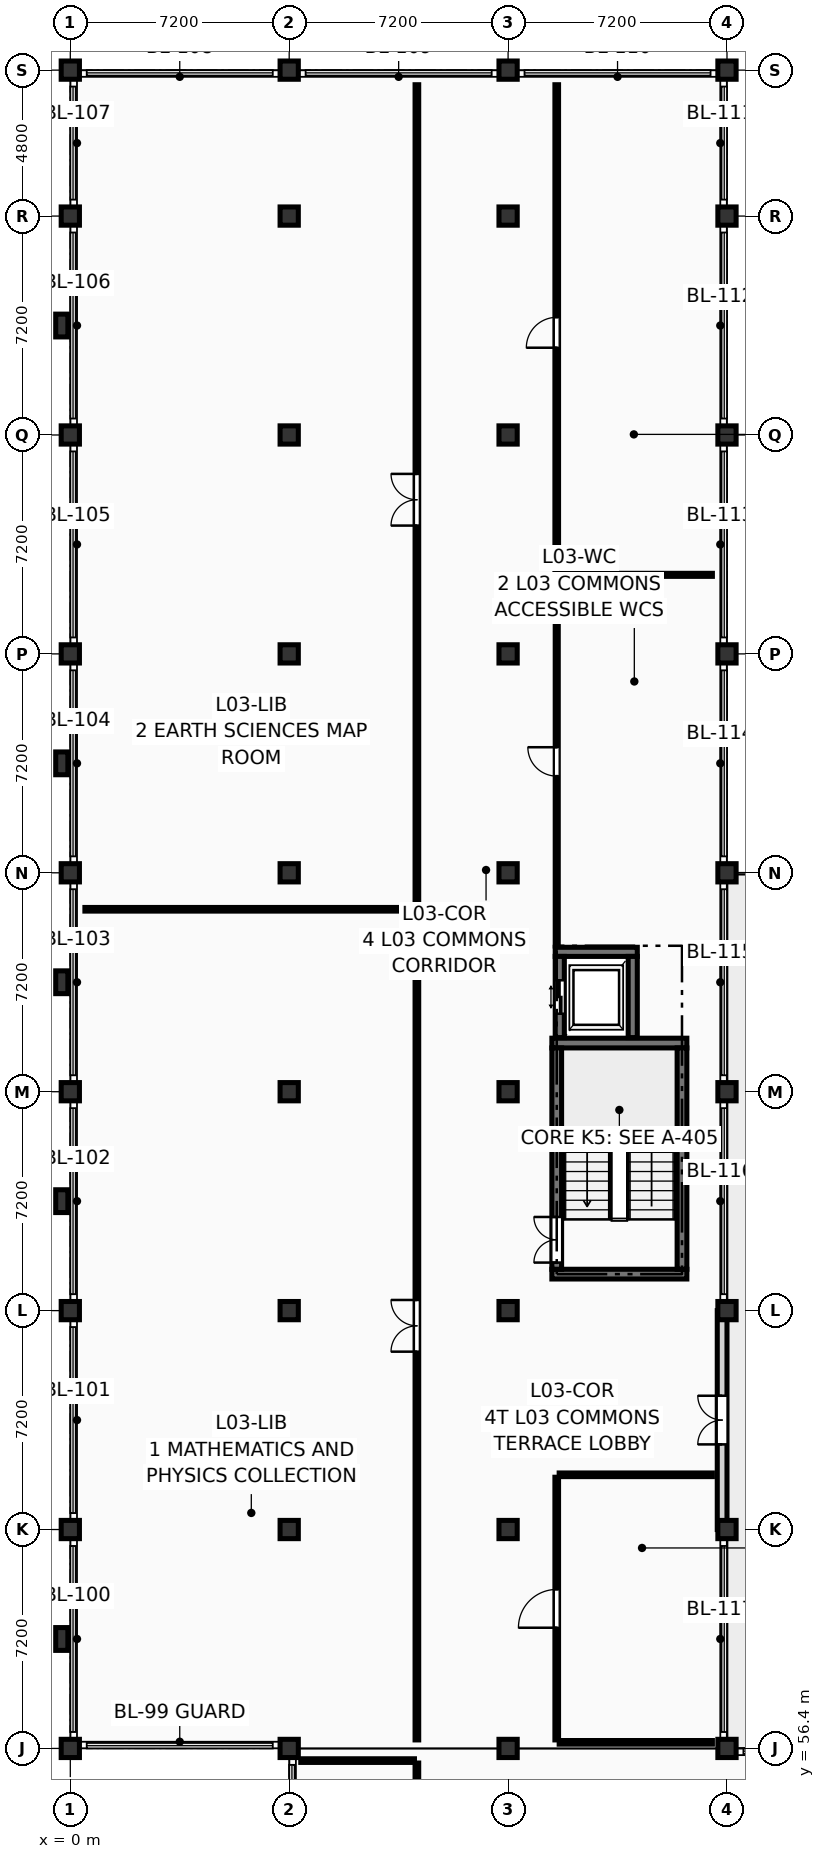
"""IFC4 building model, lengths in metres.
Left out: names, types, materials, properties, quantities, classifications, styles, units other than length and angle.
Written with IfcOpenShell. Run it as: python <this file> out.ifc"""

import sys

from ifc_helpers import new_model, si_unit, direction, frame, frame_2d, origin, origin_2d, place, context, subcontext, project, spatial, rectangle, extrude, element, fill, save


model = new_model("IFC4")
c1 = context("Model", 3, precision=1e-05, world=origin(), true_north=direction((0.0, 1.0)))
c2 = subcontext(c1, "Body", "Model", "MODEL_VIEW")
j1 = project(units=[si_unit("LENGTHUNIT", "METRE"), si_unit("PLANEANGLEUNIT", "RADIAN")], contexts=[c1])
p1 = place(None, origin())
s1 = spatial("IfcSite", under=j1, at=p1, CompositionType="ELEMENT")
p2 = place(p1, origin())
s2 = spatial("IfcBuilding", under=s1, at=p2, CompositionType="ELEMENT")
p3 = place(p2, frame((0.0, 0.0, 12.15)))
s3 = spatial("IfcBuildingStorey", under=s2, at=p3, CompositionType="ELEMENT", Elevation=12.15)
for number, where, z_axis, x_axis in (
    (1, (0.0, 56.4, 0.0), (0.0, 0.0, 1.0), (1.0, 0.0, 0.0)),
    (2, (0.0, 63.6, 0.0), (0.0, 0.0, 1.0), (1.0, 0.0, 0.0)),
    (3, (0.0, 70.8, 0.0), (0.0, 0.0, 1.0), (1.0, 0.0, 0.0)),
    (4, (0.0, 78.0, 0.0), (0.0, 0.0, 1.0), (1.0, 0.0, 0.0)),
    (5, (0.0, 85.2, 0.0), (0.0, 0.0, 1.0), (1.0, 0.0, 0.0)),
    (6, (0.0, 92.4, 0.0), (0.0, 0.0, 1.0), (1.0, 0.0, 0.0)),
    (7, (0.0, 99.6, 0.0), (0.0, 0.0, 1.0), (1.0, 0.0, 0.0)),
    (8, (0.0, 106.8, 0.0), (0.0, 0.0, 1.0), (1.0, 0.0, 0.0)),
    (9, (0.0, 111.6, 0.0), (0.0, 0.0, 1.0), (1.0, 0.0, 0.0)),
    (10, (7.2, 56.4, 0.0), (0.0, 0.0, 1.0), (1.0, 0.0, 0.0)),
    (11, (7.2, 63.6, 0.0), (0.0, 0.0, 1.0), (1.0, 0.0, 0.0)),
    (12, (7.2, 70.8, 0.0), (0.0, 0.0, 1.0), (1.0, 0.0, 0.0)),
    (13, (7.2, 78.0, 0.0), (0.0, 0.0, 1.0), (1.0, 0.0, 0.0)),
    (14, (7.2, 85.2, 0.0), (0.0, 0.0, 1.0), (1.0, 0.0, 0.0)),
    (15, (7.2, 92.4, 0.0), (0.0, 0.0, 1.0), (1.0, 0.0, 0.0)),
    (16, (7.2, 99.6, 0.0), (0.0, 0.0, 1.0), (1.0, 0.0, 0.0)),
    (17, (7.2, 106.8, 0.0), (0.0, 0.0, 1.0), (1.0, 0.0, 0.0)),
    (18, (7.2, 111.6, 0.0), (0.0, 0.0, 1.0), (1.0, 0.0, 0.0)),
    (19, (14.4, 56.4, 0.0), (0.0, 0.0, 1.0), (1.0, 0.0, 0.0)),
    (20, (14.4, 63.6, 0.0), (0.0, 0.0, 1.0), (1.0, 0.0, 0.0)),
    (21, (14.4, 70.8, 0.0), (0.0, 0.0, 1.0), (1.0, 0.0, 0.0)),
    (22, (14.4, 78.0, 0.0), (0.0, 0.0, 1.0), (1.0, 0.0, 0.0)),
    (23, (14.4, 85.2, 0.0), (0.0, 0.0, 1.0), (1.0, 0.0, 0.0)),
    (24, (14.4, 92.4, 0.0), (0.0, 0.0, 1.0), (1.0, 0.0, 0.0)),
    (25, (14.4, 99.6, 0.0), (0.0, 0.0, 1.0), (1.0, 0.0, 0.0)),
    (26, (14.4, 106.8, 0.0), (0.0, 0.0, 1.0), (1.0, 0.0, 0.0)),
    (27, (14.4, 111.6, 0.0), (0.0, 0.0, 1.0), (1.0, 0.0, 0.0)),
    (28, (21.6, 56.4, 0.0), (0.0, 0.0, 1.0), (1.0, 0.0, 0.0)),
    (29, (21.6, 63.6, 0.0), (0.0, 0.0, 1.0), (1.0, 0.0, 0.0)),
    (30, (21.6, 70.8, 0.0), (0.0, 0.0, 1.0), (1.0, 0.0, 0.0)),
    (31, (21.6, 78.0, 0.0), (0.0, 0.0, 1.0), (1.0, 0.0, 0.0)),
    (32, (21.6, 85.2, 0.0), (0.0, 0.0, 1.0), (1.0, 0.0, 0.0)),
    (33, (21.6, 92.4, 0.0), (0.0, 0.0, 1.0), (1.0, 0.0, 0.0)),
    (34, (21.6, 99.6, 0.0), (0.0, 0.0, 1.0), (1.0, 0.0, 0.0)),
    (35, (21.6, 106.8, 0.0), (0.0, 0.0, 1.0), (1.0, 0.0, 0.0)),
    (36, (21.6, 111.6, 0.0), (0.0, 0.0, 1.0), (1.0, 0.0, 0.0)),
):
    element("IfcColumn", number, at=place(p3, frame(where, z_axis=z_axis, x_axis=x_axis)), inside=s3, PredefinedType="COLUMN", context=c2, shape_type="SweptSolid", body=[
        extrude(rectangle(XDim=0.6, YDim=0.6, at=origin_2d()), origin(), (0.0, 0.0, 1.0), 3.6),
    ])
for number, where, z_axis, x_axis in (
    (37, (-0.28, 60.0, 0.0), (0.0, 0.0, 1.0), (1.0, 0.0, 0.0)),
    (38, (-0.28, 74.4, 0.0), (0.0, 0.0, 1.0), (1.0, 0.0, 0.0)),
    (39, (-0.28, 81.6, 0.0), (0.0, 0.0, 1.0), (1.0, 0.0, 0.0)),
    (40, (-0.28, 88.8, 0.0), (0.0, 0.0, 1.0), (1.0, 0.0, 0.0)),
    (41, (-0.28, 103.2, 0.0), (0.0, 0.0, 1.0), (1.0, 0.0, 0.0)),
):
    element("IfcColumn", number, at=place(p3, frame(where, z_axis=z_axis, x_axis=x_axis)), inside=s3, PredefinedType="PILASTER", context=c2, shape_type="SweptSolid", body=[
        extrude(rectangle(XDim=0.4, YDim=0.75, at=origin_2d()), origin(), (0.0, 0.0, 1.0), 3.6),
    ])
p4 = place(p3, frame((21.44, 63.6, 0.0), z_axis=(0.0, 0.0, 1.0), x_axis=(0.0, 1.0, 0.0)))
e42 = element("IfcWall", 42, at=p4, inside=s3, PredefinedType="SOLIDWALL", context=c2, shape_type="SweptSolid", body=[
    extrude(rectangle(XDim=7.2, YDim=0.32, at=frame_2d((3.6, 0.0))), origin(), (0.0, 0.0, 1.0), 2.84),
])
p5 = place(p4, frame((2.8, 0.0, 0.0)))
e43 = element("IfcOpeningElement", 43, at=p5, cuts=e42, PredefinedType="OPENING", context=c2, shape_type="SweptSolid", body=[
    extrude(rectangle(XDim=1.6, YDim=2.25, at=frame_2d((0.8, 1.125))), frame((0.0, 0.172, 0.0), z_axis=(0.0, -1.0, 0.0), x_axis=(1.0, 0.0, 0.0)), (0.0, 0.0, 1.0), 0.344),
])
for number, where, z_axis, x_axis in (
    (44, (15.84, 72.0, 0.0), (0.0, 0.0, 1.0), (1.0, 0.0, 0.0)),
    (45, (15.84, 79.6, 0.0), (0.0, 0.0, 1.0), (1.0, 0.0, 0.0)),
):
    element("IfcWall", number, at=place(p3, frame(where, z_axis=z_axis, x_axis=x_axis)), inside=s3, PredefinedType="SHEAR", context=c2, shape_type="SweptSolid", body=[
        extrude(rectangle(XDim=4.44, YDim=0.32, at=frame_2d((2.22, 0.0))), origin(), (0.0, 0.0, 1.0), 3.39),
    ])
p6 = place(p3, frame((16.0, 72.16, 0.0), z_axis=(0.0, 0.0, 1.0), x_axis=(0.0, 1.0, 0.0)))
e46 = element("IfcWall", 46, at=p6, inside=s3, PredefinedType="SHEAR", context=c2, shape_type="SweptSolid", body=[
    extrude(rectangle(XDim=7.28, YDim=0.32, at=frame_2d((3.64, 0.0))), origin(), (0.0, 0.0, 1.0), 3.39),
])
p7 = place(p6, frame((0.22, 0.0, 0.0)))
e47 = element("IfcOpeningElement", 47, at=p7, cuts=e46, PredefinedType="OPENING", context=c2, shape_type="SweptSolid", body=[
    extrude(rectangle(XDim=1.5, YDim=2.2, at=frame_2d((0.75, 1.1))), frame((0.0, 0.172, 0.0), z_axis=(0.0, -1.0, 0.0), x_axis=(1.0, 0.0, 0.0)), (0.0, 0.0, 1.0), 0.344),
])
p8 = place(p3, frame((20.12, 72.16, 0.0), z_axis=(0.0, 0.0, 1.0), x_axis=(0.0, 1.0, 0.0)))
e48 = element("IfcWall", 48, at=p8, inside=s3, PredefinedType="SHEAR", context=c2, shape_type="SweptSolid", body=[
    extrude(rectangle(XDim=7.28, YDim=0.32, at=frame_2d((3.64, 0.0))), origin(), (0.0, 0.0, 1.0), 3.39),
])
p9 = place(p3, frame((15.95, 82.6, 0.0), z_axis=(0.0, 0.0, 1.0), x_axis=(1.0, 0.0, 0.0)))
e49 = element("IfcWall", 49, at=p9, inside=s3, PredefinedType="SHEAR", context=c2, shape_type="SweptSolid", body=[
    extrude(rectangle(XDim=2.7, YDim=0.3, at=frame_2d((1.35, 0.0))), origin(), (0.0, 0.0, 1.0), 3.39),
])
p10 = place(p3, frame((16.1, 79.78, 0.0), z_axis=(0.0, 0.0, 1.0), x_axis=(0.0, 1.0, 0.0)))
e50 = element("IfcWall", 50, at=p10, inside=s3, PredefinedType="SHEAR", context=c2, shape_type="SweptSolid", body=[
    extrude(rectangle(XDim=2.67, YDim=0.3, at=frame_2d((1.335, 0.0))), origin(), (0.0, 0.0, 1.0), 3.39),
])
p11 = place(p10, frame((0.785, 0.0, 0.0)))
e51 = element("IfcOpeningElement", 51, at=p11, cuts=e50, PredefinedType="OPENING", context=c2, shape_type="SweptSolid", body=[
    extrude(rectangle(XDim=1.1, YDim=2.2, at=frame_2d((0.55, 1.1))), frame((0.0, 0.162, 0.0), z_axis=(0.0, -1.0, 0.0), x_axis=(1.0, 0.0, 0.0)), (0.0, 0.0, 1.0), 0.324),
])
p12 = place(p3, frame((18.5, 79.78, 0.0), z_axis=(0.0, 0.0, 1.0), x_axis=(0.0, 1.0, 0.0)))
e52 = element("IfcWall", 52, at=p12, inside=s3, PredefinedType="SHEAR", context=c2, shape_type="SweptSolid", body=[
    extrude(rectangle(XDim=2.67, YDim=0.3, at=frame_2d((1.335, 0.0))), origin(), (0.0, 0.0, 1.0), 3.39),
])
p13 = place(p3, frame((11.4, 38.88, 0.0), z_axis=(0.0, 0.0, 1.0), x_axis=(0.0, 1.0, 0.0)))
e53 = element("IfcWall", 53, at=p13, inside=s3, PredefinedType="PARTITIONING", context=c2, shape_type="SweptSolid", body=[
    extrude(rectangle(XDim=17.04, YDim=0.12, at=frame_2d((8.52, 0.0))), origin(), (0.0, 0.0, 1.0), 3.375),
])
p14 = place(p13, frame((7.89, 0.0, 0.0)))
e54 = element("IfcOpeningElement", 54, at=p14, cuts=e53, PredefinedType="OPENING", context=c2, shape_type="SweptSolid", body=[
    extrude(rectangle(XDim=1.26, YDim=2.18, at=frame_2d((0.63, 1.09))), frame((0.0, 0.072, 0.0), z_axis=(0.0, -1.0, 0.0), x_axis=(1.0, 0.0, 0.0)), (0.0, 0.0, 1.0), 0.144),
])
p15 = place(p3, frame((7.58, 56.0, 0.0), z_axis=(0.0, 0.0, 1.0), x_axis=(1.0, 0.0, 0.0)))
e55 = element("IfcWall", 55, at=p15, inside=s3, PredefinedType="PARTITIONING", context=c2, shape_type="SweptSolid", body=[
    extrude(rectangle(XDim=3.74, YDim=0.12, at=frame_2d((1.87, 0.0))), origin(), (0.0, 0.0, 1.0), 3.375),
])
p16 = place(p3, frame((11.4, 56.68, 0.0), z_axis=(0.0, 0.0, 1.0), x_axis=(0.0, 1.0, 0.0)))
e56 = element("IfcWall", 56, at=p16, inside=s3, PredefinedType="PARTITIONING", context=c2, shape_type="SweptSolid", body=[
    extrude(rectangle(XDim=27.24, YDim=0.12, at=frame_2d((13.62, 0.0))), origin(), (0.0, 0.0, 1.0), 3.375),
])
p17 = place(p16, frame((12.77, 0.0, 0.0)))
e57 = element("IfcOpeningElement", 57, at=p17, cuts=e56, PredefinedType="OPENING", context=c2, shape_type="SweptSolid", body=[
    extrude(rectangle(XDim=1.7, YDim=2.28, at=frame_2d((0.85, 1.14))), frame((0.0, 0.072, 0.0), z_axis=(0.0, -1.0, 0.0), x_axis=(1.0, 0.0, 0.0)), (0.0, 0.0, 1.0), 0.144),
])
p18 = place(p3, frame((0.48, 84.0, 0.0), z_axis=(0.0, 0.0, 1.0), x_axis=(1.0, 0.0, 0.0)))
e58 = element("IfcWall", 58, at=p18, inside=s3, PredefinedType="PARTITIONING", context=c2, shape_type="SweptSolid", body=[
    extrude(rectangle(XDim=10.84, YDim=0.12, at=frame_2d((5.42, 0.0))), origin(), (0.0, 0.0, 1.0), 3.375),
])
p19 = place(p3, frame((11.4, 84.08, 0.0), z_axis=(0.0, 0.0, 1.0), x_axis=(0.0, 1.0, 0.0)))
e59 = element("IfcWall", 59, at=p19, inside=s3, PredefinedType="PARTITIONING", context=c2, shape_type="SweptSolid", body=[
    extrude(rectangle(XDim=27.04, YDim=0.12, at=frame_2d((13.52, 0.0))), origin(), (0.0, 0.0, 1.0), 3.375),
])
p20 = place(p19, frame((12.54, 0.0, 0.0)))
e60 = element("IfcOpeningElement", 60, at=p20, cuts=e59, PredefinedType="OPENING", context=c2, shape_type="SweptSolid", body=[
    extrude(rectangle(XDim=1.7, YDim=2.28, at=frame_2d((0.85, 1.14))), frame((0.0, 0.072, 0.0), z_axis=(0.0, -1.0, 0.0), x_axis=(1.0, 0.0, 0.0)), (0.0, 0.0, 1.0), 0.144),
])
p21 = place(p3, frame((16.0, 56.68, 0.0), z_axis=(0.0, 0.0, 1.0), x_axis=(0.0, 1.0, 0.0)))
e61 = element("IfcWall", 61, at=p21, inside=s3, PredefinedType="PARTITIONING", context=c2, shape_type="SweptSolid", body=[
    extrude(rectangle(XDim=8.64, YDim=0.12, at=frame_2d((4.32, 0.0))), origin(), (0.0, 0.0, 1.0), 3.375),
])
p22 = place(p21, frame((3.69, 0.0, 0.0)))
e62 = element("IfcOpeningElement", 62, at=p22, cuts=e61, PredefinedType="OPENING", context=c2, shape_type="SweptSolid", body=[
    extrude(rectangle(XDim=1.26, YDim=2.18, at=frame_2d((0.63, 1.09))), frame((0.0, 0.072, 0.0), z_axis=(0.0, -1.0, 0.0), x_axis=(1.0, 0.0, 0.0)), (0.0, 0.0, 1.0), 0.144),
])
p23 = place(p3, frame((16.08, 56.6, 0.0), z_axis=(0.0, 0.0, 1.0), x_axis=(1.0, 0.0, 0.0)))
e63 = element("IfcWall", 63, at=p23, inside=s3, PredefinedType="PARTITIONING", context=c2, shape_type="SweptSolid", body=[
    extrude(rectangle(XDim=5.04, YDim=0.12, at=frame_2d((2.52, 0.0))), origin(), (0.0, 0.0, 1.0), 2.691),
])
p24 = place(p3, frame((16.08, 65.4, 0.0), z_axis=(0.0, 0.0, 1.0), x_axis=(1.0, 0.0, 0.0)))
e64 = element("IfcWall", 64, at=p24, inside=s3, PredefinedType="PARTITIONING", context=c2, shape_type="SweptSolid", body=[
    extrude(rectangle(XDim=5.04, YDim=0.12, at=frame_2d((2.52, 0.0))), origin(), (0.0, 0.0, 1.0), 3.375),
])
p25 = place(p3, frame((16.0, 82.79, 0.0), z_axis=(0.0, 0.0, 1.0), x_axis=(0.0, 1.0, 0.0)))
e65 = element("IfcWall", 65, at=p25, inside=s3, PredefinedType="PARTITIONING", context=c2, shape_type="SweptSolid", body=[
    extrude(rectangle(XDim=12.13, YDim=0.1, at=frame_2d((6.065, 0.0))), origin(), (0.0, 0.0, 1.0), 3.375),
])
p26 = place(p25, frame((5.59, 0.0, 0.0)))
e66 = element("IfcOpeningElement", 66, at=p26, cuts=e65, PredefinedType="OPENING", context=c2, shape_type="SweptSolid", body=[
    extrude(rectangle(XDim=0.95, YDim=2.1, at=frame_2d((0.475, 1.05))), frame((0.0, 0.062, 0.0), z_axis=(0.0, -1.0, 0.0), x_axis=(1.0, 0.0, 0.0)), (0.0, 0.0, 1.0), 0.124),
])
p27 = place(p3, frame((16.08, 95.0, 0.0), z_axis=(0.0, 0.0, 1.0), x_axis=(1.0, 0.0, 0.0)))
e67 = element("IfcWall", 67, at=p27, inside=s3, PredefinedType="PARTITIONING", context=c2, shape_type="SweptSolid", body=[
    extrude(rectangle(XDim=5.04, YDim=0.1, at=frame_2d((2.52, 0.0))), origin(), (0.0, 0.0, 1.0), 3.375),
])
p28 = place(p3, frame((16.0, 95.08, 0.0), z_axis=(0.0, 0.0, 1.0), x_axis=(0.0, 1.0, 0.0)))
e68 = element("IfcWall", 68, at=p28, inside=s3, PredefinedType="PARTITIONING", context=c2, shape_type="SweptSolid", body=[
    extrude(rectangle(XDim=16.04, YDim=0.12, at=frame_2d((8.02, 0.0))), origin(), (0.0, 0.0, 1.0), 3.375),
])
p29 = place(p28, frame((7.39, 0.0, 0.0)))
e69 = element("IfcOpeningElement", 69, at=p29, cuts=e68, PredefinedType="OPENING", context=c2, shape_type="SweptSolid", body=[
    extrude(rectangle(XDim=1.0, YDim=2.15, at=frame_2d((0.5, 1.075))), frame((0.0, 0.072, 0.0), z_axis=(0.0, -1.0, 0.0), x_axis=(1.0, 0.0, 0.0)), (0.0, 0.0, 1.0), 0.144),
])
p30 = place(p5, origin())
e70 = element("IfcDoor", 70, at=p30, inside=s3, OperationType="DOUBLE_DOOR_SINGLE_SWING", PredefinedType="DOOR", context=c2, shape_type="SweptSolid", body=[
    extrude(rectangle(XDim=1.6, YDim=2.25, at=frame_2d((0.8, 1.125))), frame((0.0, 0.025, 0.0), z_axis=(0.0, -1.0, 0.0), x_axis=(1.0, 0.0, 0.0)), (0.0, 0.0, 1.0), 0.05),
])
fill(e43, e70)
p31 = place(p7, origin())
e71 = element("IfcDoor", 71, at=p31, inside=s3, OperationType="DOUBLE_DOOR_SINGLE_SWING", PredefinedType="DOOR", context=c2, shape_type="SweptSolid", body=[
    extrude(rectangle(XDim=1.5, YDim=2.2, at=frame_2d((0.75, 1.1))), frame((0.0, 0.025, 0.0), z_axis=(0.0, -1.0, 0.0), x_axis=(1.0, 0.0, 0.0)), (0.0, 0.0, 1.0), 0.05),
])
fill(e47, e71)
p32 = place(p11, origin())
e72 = element("IfcDoor", 72, at=p32, inside=s3, OperationType="DOUBLE_DOOR_SLIDING", PredefinedType="DOOR", context=c2, shape_type="SweptSolid", body=[
    extrude(rectangle(XDim=1.1, YDim=2.2, at=frame_2d((0.55, 1.1))), frame((0.0, 0.025, 0.0), z_axis=(0.0, -1.0, 0.0), x_axis=(1.0, 0.0, 0.0)), (0.0, 0.0, 1.0), 0.05),
])
fill(e51, e72)
p33 = place(p17, origin())
e73 = element("IfcDoor", 73, at=p33, inside=s3, OperationType="DOUBLE_DOOR_SINGLE_SWING", PredefinedType="DOOR", context=c2, shape_type="SweptSolid", body=[
    extrude(rectangle(XDim=1.7, YDim=2.28, at=frame_2d((0.85, 1.14))), frame((0.0, 0.025, 0.0), z_axis=(0.0, -1.0, 0.0), x_axis=(1.0, 0.0, 0.0)), (0.0, 0.0, 1.0), 0.05),
])
fill(e57, e73)
p34 = place(p20, origin())
e74 = element("IfcDoor", 74, at=p34, inside=s3, OperationType="DOUBLE_DOOR_SINGLE_SWING", PredefinedType="DOOR", context=c2, shape_type="SweptSolid", body=[
    extrude(rectangle(XDim=1.7, YDim=2.28, at=frame_2d((0.85, 1.14))), frame((0.0, 0.025, 0.0), z_axis=(0.0, -1.0, 0.0), x_axis=(1.0, 0.0, 0.0)), (0.0, 0.0, 1.0), 0.05),
])
fill(e60, e74)
p35 = place(p22, origin())
e75 = element("IfcDoor", 75, at=p35, inside=s3, OperationType="SINGLE_SWING_LEFT", PredefinedType="DOOR", context=c2, shape_type="SweptSolid", body=[
    extrude(rectangle(XDim=1.26, YDim=2.18, at=frame_2d((0.63, 1.09))), frame((0.0, 0.025, 0.0), z_axis=(0.0, -1.0, 0.0), x_axis=(1.0, 0.0, 0.0)), (0.0, 0.0, 1.0), 0.05),
])
fill(e62, e75)
p36 = place(p26, origin())
e76 = element("IfcDoor", 76, at=p36, inside=s3, OperationType="SINGLE_SWING_RIGHT", PredefinedType="DOOR", context=c2, shape_type="SweptSolid", body=[
    extrude(rectangle(XDim=0.95, YDim=2.1, at=frame_2d((0.475, 1.05))), frame((0.0, 0.025, 0.0), z_axis=(0.0, -1.0, 0.0), x_axis=(1.0, 0.0, 0.0)), (0.0, 0.0, 1.0), 0.05),
])
fill(e66, e76)
p37 = place(p29, origin())
e77 = element("IfcDoor", 77, at=p37, inside=s3, OperationType="SINGLE_SWING_LEFT", PredefinedType="DOOR", context=c2, shape_type="SweptSolid", body=[
    extrude(rectangle(XDim=1.0, YDim=2.15, at=frame_2d((0.5, 1.075))), frame((0.0, 0.025, 0.0), z_axis=(0.0, -1.0, 0.0), x_axis=(1.0, 0.0, 0.0)), (0.0, 0.0, 1.0), 0.05),
])
fill(e69, e77)
save(model, sys.argv[1])
